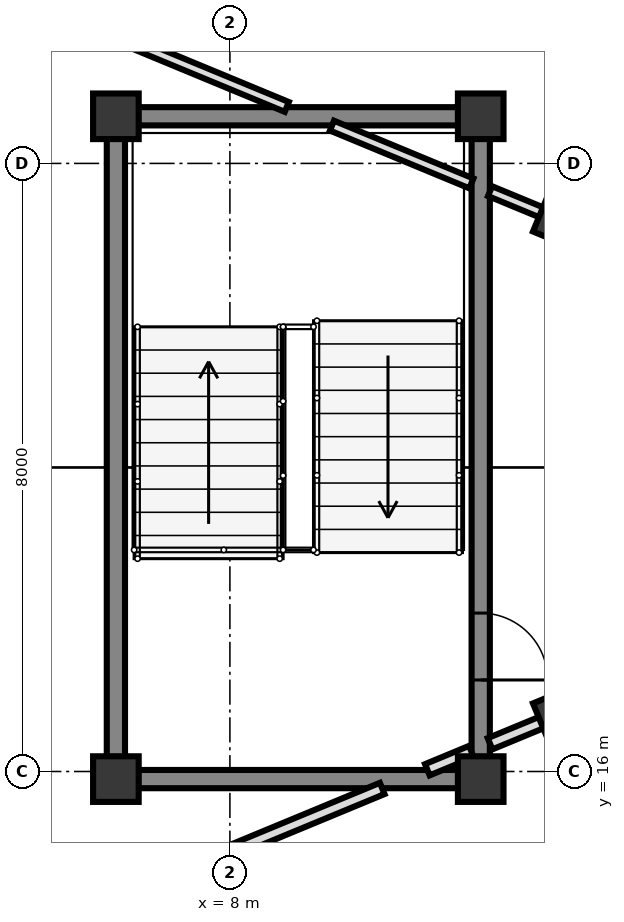
"""IFC4 building model, lengths in metres.
Left out: names, types, materials, properties, quantities, classifications, styles, units other than length and angle.
Written with IfcOpenShell. Run it as: python <this file> out.ifc"""

import sys

from ifc_helpers import new_model, si_unit, direction, frame, frame_2d, origin, origin_2d, place, context, subcontext, project, spatial, rectangle, extrude, element, fill, save


model = new_model("IFC4")
c1 = context("Model", 3, precision=1e-05, world=origin(), true_north=direction((0.0, 1.0)))
c2 = subcontext(c1, "Body", "Model", "MODEL_VIEW")
j1 = project(units=[si_unit("LENGTHUNIT", "METRE"), si_unit("PLANEANGLEUNIT", "RADIAN")], contexts=[c1])
p1 = place(None, origin())
s1 = spatial("IfcSite", under=j1, at=p1, CompositionType="ELEMENT")
p2 = place(p1, origin())
s2 = spatial("IfcBuilding", under=s1, at=p2, CompositionType="ELEMENT")
p3 = place(p2, frame((0.0, 0.0, 4.5)))
s3 = spatial("IfcBuildingStorey", under=s2, at=p3, CompositionType="ELEMENT", Elevation=4.5)
for number, where, z_axis, x_axis in (
    (1, (6.5, 15.9, 0.0), (0.0, 0.0, 1.0), (1.0, 0.0, 0.0)),
    (2, (11.3, 15.9, 0.0), (0.0, 0.0, 1.0), (1.0, 0.0, 0.0)),
    (3, (11.3, 24.62, 0.0), (0.0, 0.0, 1.0), (1.0, 0.0, 0.0)),
    (4, (6.5, 24.62, 0.0), (0.0, 0.0, 1.0), (1.0, 0.0, 0.0)),
):
    element("IfcColumn", number, at=place(p3, frame(where, z_axis=z_axis, x_axis=x_axis)), inside=s3, PredefinedType="COLUMN", context=c2, shape_type="SweptSolid", body=[
        extrude(rectangle(XDim=0.6, YDim=0.6, at=origin_2d()), origin(), (0.0, 0.0, 1.0), 4.0),
    ])
for number, where, z_axis, x_axis in (
    (5, (12.347, 23.253, 0.0), (0.0, 0.0, 1.0), (-0.924, 0.383, 0.0)),
    (6, (12.347, 16.747, 0.0), (0.0, 0.0, 1.0), (-0.924, -0.383, 0.0)),
):
    element("IfcColumn", number, at=place(p3, frame(where, z_axis=z_axis, x_axis=x_axis)), inside=s3, PredefinedType="COLUMN", context=c2, shape_type="SweptSolid", body=[
        extrude(rectangle(XDim=0.55, YDim=0.55, at=origin_2d()), origin(), (0.0, 0.0, 1.0), 4.0),
    ])
p4 = place(p3, frame((6.5, 16.192, 0.0), z_axis=(0.0, 0.0, 1.0), x_axis=(0.0, 1.0, 0.0)))
e7 = element("IfcWall", 7, at=p4, inside=s3, PredefinedType="SHEAR", context=c2, shape_type="SweptSolid", body=[
    extrude(rectangle(XDim=8.136, YDim=0.24, at=frame_2d((4.068, 0.0))), origin(), (0.0, 0.0, 1.0), 3.74),
])
p5 = place(p3, frame((11.3, 24.328, 0.0), z_axis=(0.0, 0.0, 1.0), x_axis=(0.0, -1.0, 0.0)))
e8 = element("IfcWall", 8, at=p5, inside=s3, PredefinedType="SHEAR", context=c2, shape_type="SweptSolid", body=[
    extrude(rectangle(XDim=8.136, YDim=0.24, at=frame_2d((4.068, 0.0))), origin(), (0.0, 0.0, 1.0), 3.74),
])
p6 = place(p5, frame((6.244, 0.0, 0.0)))
e9 = element("IfcOpeningElement", 9, at=p6, cuts=e8, PredefinedType="OPENING", context=c2, shape_type="SweptSolid", body=[
    extrude(rectangle(XDim=0.88, YDim=2.1, at=frame_2d((0.44, 1.05))), frame((0.0, 0.13, 0.0), z_axis=(0.0, -1.0, 0.0), x_axis=(1.0, 0.0, 0.0)), (0.0, 0.0, 1.0), 0.26),
])
for number, where, z_axis, x_axis in (
    (10, (11.008, 15.9, 0.0), (0.0, 0.0, 1.0), (-1.0, 0.0, 0.0)),
    (11, (11.008, 24.62, 0.0), (0.0, 0.0, 1.0), (-1.0, 0.0, 0.0)),
):
    element("IfcWall", number, at=place(p3, frame(where, z_axis=z_axis, x_axis=x_axis)), inside=s3, PredefinedType="SHEAR", context=c2, shape_type="SweptSolid", body=[
        extrude(rectangle(XDim=4.216, YDim=0.24, at=frame_2d((2.108, 0.0))), origin(), (0.0, 0.0, 1.0), 3.74),
    ])
p7 = place(p3, frame((12.1, 23.355, 0.0), z_axis=(0.0, 0.0, 1.0), x_axis=(-0.924069600435, 0.382224245113, 0.0)))
e12 = element("IfcWall", 12, at=p7, inside=s3, PredefinedType="PARTITIONING", context=c2, shape_type="SweptSolid", body=[
    extrude(rectangle(XDim=0.733, YDim=0.14, at=frame_2d((0.366, 0.0))), origin(), (0.0, 0.0, 1.0), 3.7),
])
p8 = place(p3, frame((11.177, 23.737, 0.0), z_axis=(0.0, 0.0, 1.0), x_axis=(-0.923817443679, 0.382833293686, 0.0)))
e13 = element("IfcWall", 13, at=p8, inside=s3, PredefinedType="PARTITIONING", context=c2, shape_type="SweptSolid", body=[
    extrude(rectangle(XDim=1.985, YDim=0.14, at=frame_2d((0.993, 0.0))), origin(), (0.0, 0.0, 1.0), 3.7),
])
p9 = place(p3, frame((8.749, 24.743, 0.0), z_axis=(0.0, 0.0, 1.0), x_axis=(-0.923877739946, 0.382687759972, 0.0)))
e14 = element("IfcWall", 14, at=p9, inside=s3, PredefinedType="PARTITIONING", context=c2, shape_type="SweptSolid", body=[
    extrude(rectangle(XDim=4.813, YDim=0.14, at=frame_2d((2.407, 0.0))), origin(), (0.0, 0.0, 1.0), 3.7),
])
p10 = place(p3, frame((12.1, 16.645, 0.0), z_axis=(0.0, 0.0, 1.0), x_axis=(-0.924069600435, -0.382224245113, 0.0)))
e15 = element("IfcWall", 15, at=p10, inside=s3, PredefinedType="PARTITIONING", context=c2, shape_type="SweptSolid", body=[
    extrude(rectangle(XDim=0.733, YDim=0.16, at=frame_2d((0.366, 0.0))), origin(), (0.0, 0.0, 1.0), 3.072),
])
p11 = place(p3, frame((11.177, 16.263, 0.0), z_axis=(0.0, 0.0, 1.0), x_axis=(-0.923812676193, -0.382844797933, 0.0)))
e16 = element("IfcWall", 16, at=p11, inside=s3, PredefinedType="PARTITIONING", context=c2, shape_type="SweptSolid", body=[
    extrude(rectangle(XDim=0.627, YDim=0.16, at=frame_2d((0.313, 0.0))), origin(), (0.0, 0.0, 1.0), 3.072),
])
p12 = place(p3, frame((10.004, 15.777, 0.0), z_axis=(0.0, 0.0, 1.0), x_axis=(-0.923864955254, -0.382718623082, 0.0)))
e17 = element("IfcWall", 17, at=p12, inside=s3, PredefinedType="PARTITIONING", context=c2, shape_type="SweptSolid", body=[
    extrude(rectangle(XDim=6.172, YDim=0.16, at=frame_2d((3.086, 0.0))), origin(), (0.0, 0.0, 1.0), 3.072),
])
p13 = place(p6, origin())
e18 = element("IfcDoor", 18, at=p13, inside=s3, OperationType="SINGLE_SWING_RIGHT", PredefinedType="DOOR", context=c2, shape_type="SweptSolid", body=[
    extrude(rectangle(XDim=0.88, YDim=2.1, at=frame_2d((0.44, 1.05))), frame((0.0, 0.025, 0.0), z_axis=(0.0, -1.0, 0.0), x_axis=(1.0, 0.0, 0.0)), (0.0, 0.0, 1.0), 0.05),
])
fill(e9, e18)
save(model, sys.argv[1])
